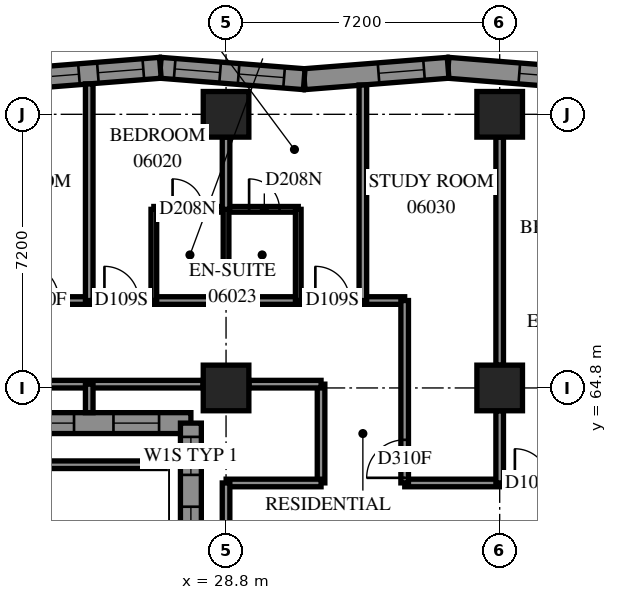
"""IFC4 building model, lengths in metres.
Left out: names, types, materials, properties, quantities, classifications, styles, units other than length and angle.
Written with IfcOpenShell. Run it as: python <this file> out.ifc"""

import sys

from ifc_helpers import new_model, si_unit, direction, frame, frame_2d, origin, origin_2d, place, context, subcontext, project, spatial, polyline, rectangle, outline, extrude, element, fill, save


model = new_model("IFC4")
c1 = context("Model", 3, precision=1e-05, world=origin(), true_north=direction((0.0, 1.0)))
c2 = subcontext(c1, "Body", "Model", "MODEL_VIEW")
j1 = project(units=[si_unit("LENGTHUNIT", "METRE"), si_unit("PLANEANGLEUNIT", "RADIAN")], contexts=[c1])
p1 = place(None, origin())
s1 = spatial("IfcSite", under=j1, at=p1, CompositionType="ELEMENT")
p2 = place(p1, origin())
s2 = spatial("IfcBuilding", under=s1, at=p2, CompositionType="ELEMENT")
p3 = place(p2, frame((0.0, 0.0, 27.0)))
s3 = spatial("IfcBuildingStorey", under=s2, at=p3, CompositionType="ELEMENT", Elevation=27.0)
for number, where, z_axis, x_axis in (
    (1, (28.8, 64.8, 0.0), (0.0, 0.0, 1.0), (1.0, 0.0, 0.0)),
    (2, (28.8, 72.0, 0.0), (0.0, 0.0, 1.0), (1.0, 0.0, 0.0)),
    (3, (36.0, 64.8, 0.0), (0.0, 0.0, 1.0), (1.0, 0.0, 0.0)),
    (4, (36.0, 72.0, 0.0), (0.0, 0.0, 1.0), (1.0, 0.0, 0.0)),
):
    element("IfcColumn", number, at=place(p3, frame(where, z_axis=z_axis, x_axis=x_axis)), inside=s3, PredefinedType="COLUMN", context=c2, shape_type="SweptSolid", body=[
        extrude(rectangle(XDim=1.2, YDim=1.2, at=origin_2d()), origin(), (0.0, 0.0, 1.0), 3.1),
    ])
p4 = place(p3, frame((38.428, 72.924, 0.0), z_axis=(0.0, 0.0, 1.0), x_axis=(-0.9968746163, 0.078999996, 0.0)))
e5 = element("IfcWall", 5, at=p4, inside=s3, PredefinedType="SOLIDWALL", context=c2, shape_type="SweptSolid", body=[
    extrude(outline(polyline([(0.022, -0.275), (3.819, -0.275), (3.776, 0.275), (-0.022, 0.275), (0.022, -0.275)])), origin(), (0.0, 0.0, 1.0), 3.1),
])
p5 = place(p4, frame((0.718, 0.0, 0.5)))
e6 = element("IfcOpeningElement", 6, at=p5, cuts=e5, PredefinedType="OPENING", context=c2, shape_type="SweptSolid", body=[
    extrude(rectangle(XDim=1.2, YDim=2.45, at=frame_2d((0.6, 1.225))), frame((0.0, 0.285, 0.0), z_axis=(0.0, -1.0, 0.0), x_axis=(1.0, 0.0, 0.0)), (0.0, 0.0, 1.0), 0.57),
])
p6 = place(p3, frame((34.642, 73.224, 0.0), z_axis=(0.0, 0.0, 1.0), x_axis=(-0.9968746163, -0.078999996, 0.0)))
e7 = element("IfcWall", 7, at=p6, inside=s3, PredefinedType="SOLIDWALL", context=c2, shape_type="SweptSolid", body=[
    extrude(outline(polyline([(-0.022, -0.275), (3.776, -0.275), (3.819, 0.275), (0.022, 0.275), (-0.022, -0.275)])), origin(), (0.0, 0.0, 1.0), 3.1),
])
p7 = place(p6, frame((0.636, 0.0, 0.5)))
e8 = element("IfcOpeningElement", 8, at=p7, cuts=e7, PredefinedType="OPENING", context=c2, shape_type="SweptSolid", body=[
    extrude(rectangle(XDim=1.2, YDim=2.45, at=frame_2d((0.6, 1.225))), frame((0.0, 0.285, 0.0), z_axis=(0.0, -1.0, 0.0), x_axis=(1.0, 0.0, 0.0)), (0.0, 0.0, 1.0), 0.57),
])
p8 = place(p3, frame((30.857, 72.924, 0.0), z_axis=(0.0, 0.0, 1.0), x_axis=(-0.9968747806, 0.0789979222, 0.0)))
e9 = element("IfcWall", 9, at=p8, inside=s3, PredefinedType="SOLIDWALL", context=c2, shape_type="SweptSolid", body=[
    extrude(outline(polyline([(0.022, -0.275), (3.819, -0.275), (3.776, 0.275), (-0.022, 0.275), (0.022, -0.275)])), origin(), (0.0, 0.0, 1.0), 3.1),
])
p9 = place(p8, frame((0.532, 0.0, 0.5)))
e10 = element("IfcOpeningElement", 10, at=p9, cuts=e9, PredefinedType="OPENING", context=c2, shape_type="SweptSolid", body=[
    extrude(rectangle(XDim=1.2, YDim=2.45, at=frame_2d((0.6, 1.225))), frame((0.0, 0.285, 0.0), z_axis=(0.0, -1.0, 0.0), x_axis=(1.0, 0.0, 0.0)), (0.0, 0.0, 1.0), 0.57),
])
p10 = place(p8, frame((2.22, 0.0, 0.5)))
e11 = element("IfcOpeningElement", 11, at=p10, cuts=e9, PredefinedType="OPENING", context=c2, shape_type="SweptSolid", body=[
    extrude(rectangle(XDim=1.2, YDim=2.45, at=frame_2d((0.6, 1.225))), frame((0.0, 0.285, 0.0), z_axis=(0.0, -1.0, 0.0), x_axis=(1.0, 0.0, 0.0)), (0.0, 0.0, 1.0), 0.57),
])
p11 = place(p3, frame((27.071, 73.224, 0.0), z_axis=(0.0, 0.0, 1.0), x_axis=(-0.9968745318, -0.0790010628, 0.0)))
e12 = element("IfcWall", 12, at=p11, inside=s3, PredefinedType="SOLIDWALL", context=c2, shape_type="SweptSolid", body=[
    extrude(outline(polyline([(-0.022, -0.275), (3.776, -0.275), (3.862, 0.275), (0.022, 0.275), (-0.022, -0.275)])), origin(), (0.0, 0.0, 1.0), 3.1),
])
p12 = place(p11, frame((0.449, 0.0, 0.5)))
e13 = element("IfcOpeningElement", 13, at=p12, cuts=e12, PredefinedType="OPENING", context=c2, shape_type="SweptSolid", body=[
    extrude(rectangle(XDim=1.2, YDim=2.45, at=frame_2d((0.6, 1.225))), frame((0.0, 0.285, 0.0), z_axis=(0.0, -1.0, 0.0), x_axis=(1.0, 0.0, 0.0)), (0.0, 0.0, 1.0), 0.57),
])
p13 = place(p11, frame((2.148, 0.0, 0.5)))
e14 = element("IfcOpeningElement", 14, at=p13, cuts=e12, PredefinedType="OPENING", context=c2, shape_type="SweptSolid", body=[
    extrude(rectangle(XDim=1.2, YDim=2.45, at=frame_2d((0.6, 1.225))), frame((0.0, 0.285, 0.0), z_axis=(0.0, -1.0, 0.0), x_axis=(1.0, 0.0, 0.0)), (0.0, 0.0, 1.0), 0.57),
])
p14 = place(p3, frame((19.775, 63.875, 0.0), z_axis=(0.0, 0.0, 1.0), x_axis=(1.0, 0.0, 0.0)))
e15 = element("IfcWall", 15, at=p14, inside=s3, PredefinedType="SOLIDWALL", context=c2, shape_type="SweptSolid", body=[
    extrude(outline(polyline([(-0.275, -0.275), (7.825, -0.275), (8.375, 0.275), (0.275, 0.275), (-0.275, -0.275)])), origin(), (0.0, 0.0, 1.0), 3.1),
])
p15 = place(p14, frame((2.225, 0.0, 0.5)))
e16 = element("IfcOpeningElement", 16, at=p15, cuts=e15, PredefinedType="OPENING", context=c2, shape_type="SweptSolid", body=[
    extrude(rectangle(XDim=2.8, YDim=2.45, at=frame_2d((1.4, 1.225))), frame((0.0, 0.285, 0.0), z_axis=(0.0, -1.0, 0.0), x_axis=(1.0, 0.0, 0.0)), (0.0, 0.0, 1.0), 0.57),
])
p16 = place(p14, frame((6.062, 0.0, 0.5)))
e17 = element("IfcOpeningElement", 17, at=p16, cuts=e15, PredefinedType="OPENING", context=c2, shape_type="SweptSolid", body=[
    extrude(rectangle(XDim=1.2, YDim=2.45, at=frame_2d((0.6, 1.225))), frame((0.0, 0.285, 0.0), z_axis=(0.0, -1.0, 0.0), x_axis=(1.0, 0.0, 0.0)), (0.0, 0.0, 1.0), 0.57),
])
p17 = place(p3, frame((27.875, 63.875, 0.0), z_axis=(0.0, 0.0, 1.0), x_axis=(0.0, -1.0, 0.0)))
e18 = element("IfcWall", 18, at=p17, inside=s3, PredefinedType="SOLIDWALL", context=c2, shape_type="SweptSolid", body=[
    extrude(outline(polyline([(0.275, -0.275), (7.475, -0.275), (6.925, 0.275), (-0.275, 0.275), (0.275, -0.275)])), origin(), (0.0, 0.0, 1.0), 3.1),
])
p18 = place(p17, frame((3.975, 0.0, 0.7)))
e19 = element("IfcOpeningElement", 19, at=p18, cuts=e18, PredefinedType="OPENING", context=c2, shape_type="SweptSolid", body=[
    extrude(rectangle(XDim=1.8, YDim=2.2, at=frame_2d((0.9, 1.1))), frame((0.0, 0.285, 0.0), z_axis=(0.0, -1.0, 0.0), x_axis=(1.0, 0.0, 0.0)), (0.0, 0.0, 1.0), 0.57),
])
p19 = place(p17, frame((0.362, 0.0, 0.45)))
e20 = element("IfcOpeningElement", 20, at=p19, cuts=e18, PredefinedType="OPENING", context=c2, shape_type="SweptSolid", body=[
    extrude(rectangle(XDim=1.0, YDim=2.5, at=frame_2d((0.5, 1.25))), frame((0.0, 0.285, 0.0), z_axis=(0.0, -1.0, 0.0), x_axis=(1.0, 0.0, 0.0)), (0.0, 0.0, 1.0), 0.57),
])
p20 = place(p17, frame((2.2, 0.0, 0.5)))
e21 = element("IfcOpeningElement", 21, at=p20, cuts=e18, PredefinedType="OPENING", context=c2, shape_type="SweptSolid", body=[
    extrude(rectangle(XDim=1.2, YDim=2.45, at=frame_2d((0.6, 1.225))), frame((0.0, 0.285, 0.0), z_axis=(0.0, -1.0, 0.0), x_axis=(1.0, 0.0, 0.0)), (0.0, 0.0, 1.0), 0.57),
])
p21 = place(p3, frame((33.502, 62.3, 0.0), z_axis=(0.0, 0.0, 1.0), x_axis=(1.0, 0.0, 0.0)))
e22 = element("IfcWall", 22, at=p21, inside=s3, PredefinedType="PARTITIONING", context=c2, shape_type="SweptSolid", body=[
    extrude(rectangle(XDim=20.998, YDim=0.2, at=frame_2d((10.499, 0.0))), origin(), (0.0, 0.0, 1.0), 3.1),
])
p22 = place(p21, frame((2.898, 0.0, 0.0)))
e23 = element("IfcOpeningElement", 23, at=p22, cuts=e22, PredefinedType="OPENING", context=c2, shape_type="SweptSolid", body=[
    extrude(rectangle(XDim=0.9, YDim=2.1, at=frame_2d((0.45, 1.05))), frame((0.0, 0.11, 0.0), z_axis=(0.0, -1.0, 0.0), x_axis=(1.0, 0.0, 0.0)), (0.0, 0.0, 1.0), 0.22),
])
p23 = place(p21, frame((8.448, 0.0, 0.0)))
e24 = element("IfcOpeningElement", 24, at=p23, cuts=e22, PredefinedType="OPENING", context=c2, shape_type="SweptSolid", body=[
    extrude(rectangle(XDim=0.9, YDim=2.1, at=frame_2d((0.45, 1.05))), frame((0.0, 0.11, 0.0), z_axis=(0.0, -1.0, 0.0), x_axis=(1.0, 0.0, 0.0)), (0.0, 0.0, 1.0), 0.22),
])
p24 = place(p21, frame((10.098, 0.0, 0.0)))
e25 = element("IfcOpeningElement", 25, at=p24, cuts=e22, PredefinedType="OPENING", context=c2, shape_type="SweptSolid", body=[
    extrude(rectangle(XDim=0.9, YDim=2.1, at=frame_2d((0.45, 1.05))), frame((0.0, 0.11, 0.0), z_axis=(0.0, -1.0, 0.0), x_axis=(1.0, 0.0, 0.0)), (0.0, 0.0, 1.0), 0.22),
])
p25 = place(p21, frame((15.648, 0.0, 0.0)))
e26 = element("IfcOpeningElement", 26, at=p25, cuts=e22, PredefinedType="OPENING", context=c2, shape_type="SweptSolid", body=[
    extrude(rectangle(XDim=0.9, YDim=2.1, at=frame_2d((0.45, 1.05))), frame((0.0, 0.11, 0.0), z_axis=(0.0, -1.0, 0.0), x_axis=(1.0, 0.0, 0.0)), (0.0, 0.0, 1.0), 0.22),
])
p26 = place(p21, frame((17.298, 0.0, 0.0)))
e27 = element("IfcOpeningElement", 27, at=p26, cuts=e22, PredefinedType="OPENING", context=c2, shape_type="SweptSolid", body=[
    extrude(rectangle(XDim=0.9, YDim=2.1, at=frame_2d((0.45, 1.05))), frame((0.0, 0.11, 0.0), z_axis=(0.0, -1.0, 0.0), x_axis=(1.0, 0.0, 0.0)), (0.0, 0.0, 1.0), 0.22),
])
p27 = place(p3, frame((21.602, 67.1, 0.0), z_axis=(0.0, 0.0, 1.0), x_axis=(1.0, 0.0, 0.0)))
e28 = element("IfcWall", 28, at=p27, inside=s3, PredefinedType="PARTITIONING", context=c2, shape_type="SweptSolid", body=[
    extrude(rectangle(XDim=11.898, YDim=0.2, at=frame_2d((5.949, 0.0))), origin(), (0.0, 0.0, 1.0), 3.1),
])
p28 = place(p27, frame((1.798, 0.0, 0.0)))
e29 = element("IfcOpeningElement", 29, at=p28, cuts=e28, PredefinedType="OPENING", context=c2, shape_type="SweptSolid", body=[
    extrude(rectangle(XDim=1.0, YDim=2.1, at=frame_2d((0.5, 1.05))), frame((0.0, 0.11, 0.0), z_axis=(0.0, -1.0, 0.0), x_axis=(1.0, 0.0, 0.0)), (0.0, 0.0, 1.0), 0.22),
])
p29 = place(p27, frame((3.998, 0.0, 0.0)))
e30 = element("IfcOpeningElement", 30, at=p29, cuts=e28, PredefinedType="OPENING", context=c2, shape_type="SweptSolid", body=[
    extrude(rectangle(XDim=0.9, YDim=2.1, at=frame_2d((0.45, 1.05))), frame((0.0, 0.11, 0.0), z_axis=(0.0, -1.0, 0.0), x_axis=(1.0, 0.0, 0.0)), (0.0, 0.0, 1.0), 0.22),
])
p30 = place(p27, frame((9.548, 0.0, 0.0)))
e31 = element("IfcOpeningElement", 31, at=p30, cuts=e28, PredefinedType="OPENING", context=c2, shape_type="SweptSolid", body=[
    extrude(rectangle(XDim=0.9, YDim=2.1, at=frame_2d((0.45, 1.05))), frame((0.0, 0.11, 0.0), z_axis=(0.0, -1.0, 0.0), x_axis=(1.0, 0.0, 0.0)), (0.0, 0.0, 1.0), 0.22),
])
p31 = place(p3, frame((22.2, 64.9, 0.0), z_axis=(0.0, 0.0, 1.0), x_axis=(1.0, 0.0, 0.0)))
e32 = element("IfcWall", 32, at=p31, inside=s3, PredefinedType="PARTITIONING", context=c2, shape_type="SweptSolid", body=[
    extrude(rectangle(XDim=6.0, YDim=0.2, at=frame_2d((3.0, 0.0))), origin(), (0.0, 0.0, 1.0), 2.6),
])
p32 = place(p3, frame((36.0, 65.4, 0.0), z_axis=(0.0, 0.0, 1.0), x_axis=(0.0, 1.0, 0.0)))
e33 = element("IfcWall", 33, at=p32, inside=s3, PredefinedType="PARTITIONING", context=c2, shape_type="SweptSolid", body=[
    extrude(rectangle(XDim=6.0, YDim=0.2, at=frame_2d((3.0, 0.0))), origin(), (0.0, 0.0, 1.0), 3.1),
])
p33 = place(p3, frame((25.2, 67.1, 0.0), z_axis=(0.0, 0.0, 1.0), x_axis=(0.0, 1.0, 0.0)))
e34 = element("IfcWall", 34, at=p33, inside=s3, PredefinedType="PARTITIONING", context=c2, shape_type="SweptSolid", body=[
    extrude(rectangle(XDim=5.7, YDim=0.2, at=frame_2d((2.85, 0.0))), origin(), (0.0, 0.0, 1.0), 3.1),
])
p34 = place(p3, frame((32.4, 67.1, 0.0), z_axis=(0.0, 0.0, 1.0), x_axis=(0.0, 1.0, 0.0)))
e35 = element("IfcWall", 35, at=p34, inside=s3, PredefinedType="PARTITIONING", context=c2, shape_type="SweptSolid", body=[
    extrude(rectangle(XDim=5.671, YDim=0.2, at=frame_2d((2.835, 0.0))), origin(), (0.0, 0.0, 1.0), 3.1),
])
p35 = place(p3, frame((33.5, 62.302, 0.0), z_axis=(0.0, 0.0, 1.0), x_axis=(0.0, 1.0, 0.0)))
e36 = element("IfcWall", 36, at=p35, inside=s3, PredefinedType="PARTITIONING", context=c2, shape_type="SweptSolid", body=[
    extrude(rectangle(XDim=4.798, YDim=0.2, at=frame_2d((2.399, 0.0))), origin(), (0.0, 0.0, 1.0), 3.1),
])
p36 = place(p35, frame((0.133, 0.0, 0.0)))
e37 = element("IfcOpeningElement", 37, at=p36, cuts=e36, PredefinedType="OPENING", context=c2, shape_type="SweptSolid", body=[
    extrude(rectangle(XDim=1.0, YDim=2.1, at=frame_2d((0.5, 1.05))), frame((0.0, 0.11, 0.0), z_axis=(0.0, -1.0, 0.0), x_axis=(1.0, 0.0, 0.0)), (0.0, 0.0, 1.0), 0.22),
])
p37 = place(p3, frame((26.9, 69.5, 0.0), z_axis=(0.0, 0.0, 1.0), x_axis=(1.0, 0.0, 0.0)))
e38 = element("IfcWall", 38, at=p37, inside=s3, PredefinedType="PARTITIONING", context=c2, shape_type="SweptSolid", body=[
    extrude(rectangle(XDim=3.8, YDim=0.15, at=frame_2d((1.9, 0.0))), origin(), (0.0, 0.0, 1.0), 3.1),
])
p38 = place(p37, frame((0.493, 0.0, 0.0)))
e39 = element("IfcOpeningElement", 39, at=p38, cuts=e38, PredefinedType="OPENING", context=c2, shape_type="SweptSolid", body=[
    extrude(rectangle(XDim=0.8, YDim=2.1, at=frame_2d((0.4, 1.05))), frame((0.0, 0.085, 0.0), z_axis=(0.0, -1.0, 0.0), x_axis=(1.0, 0.0, 0.0)), (0.0, 0.0, 1.0), 0.17),
])
p39 = place(p37, frame((2.507, 0.0, 0.0)))
e40 = element("IfcOpeningElement", 40, at=p39, cuts=e38, PredefinedType="OPENING", context=c2, shape_type="SweptSolid", body=[
    extrude(rectangle(XDim=0.8, YDim=2.1, at=frame_2d((0.4, 1.05))), frame((0.0, 0.085, 0.0), z_axis=(0.0, -1.0, 0.0), x_axis=(1.0, 0.0, 0.0)), (0.0, 0.0, 1.0), 0.17),
])
p40 = place(p3, frame((31.3, 62.302, 0.0), z_axis=(0.0, 0.0, 1.0), x_axis=(0.0, 1.0, 0.0)))
e41 = element("IfcWall", 41, at=p40, inside=s3, PredefinedType="PARTITIONING", context=c2, shape_type="SweptSolid", body=[
    extrude(rectangle(XDim=2.598, YDim=0.2, at=frame_2d((1.299, 0.0))), origin(), (0.0, 0.0, 1.0), 3.1),
])
p41 = place(p3, frame((28.802, 62.3, 0.0), z_axis=(0.0, 0.0, 1.0), x_axis=(1.0, 0.0, 0.0)))
e42 = element("IfcWall", 42, at=p41, inside=s3, PredefinedType="PARTITIONING", context=c2, shape_type="SweptSolid", body=[
    extrude(rectangle(XDim=2.498, YDim=0.2, at=frame_2d((1.249, 0.0))), origin(), (0.0, 0.0, 1.0), 3.1),
])
for number, where, z_axis, x_axis in (
    (43, (26.9, 67.1, 0.0), (0.0, 0.0, 1.0), (0.0, 1.0, 0.0)),
    (44, (28.8, 67.1, 0.0), (0.0, 0.0, 1.0), (0.0, 1.0, 0.0)),
    (45, (30.7, 67.1, 0.0), (0.0, 0.0, 1.0), (0.0, 1.0, 0.0)),
):
    element("IfcWall", number, at=place(p3, frame(where, z_axis=z_axis, x_axis=x_axis)), inside=s3, PredefinedType="PARTITIONING", context=c2, shape_type="SweptSolid", body=[
        extrude(rectangle(XDim=2.4, YDim=0.15, at=frame_2d((1.2, 0.0))), origin(), (0.0, 0.0, 1.0), 3.1),
    ])
p42 = place(p3, frame((28.8, 60.1, 0.0), z_axis=(0.0, 0.0, 1.0), x_axis=(0.0, 1.0, 0.0)))
e46 = element("IfcWall", 46, at=p42, inside=s3, PredefinedType="PARTITIONING", context=c2, shape_type="SweptSolid", body=[
    extrude(rectangle(XDim=2.2, YDim=0.2, at=frame_2d((1.1, 0.0))), origin(), (0.0, 0.0, 1.0), 2.6),
])
for number, where, z_axis, x_axis in (
    (47, (28.8, 69.5, 0.0), (0.0, 0.0, 1.0), (0.0, 1.0, 0.0)),
    (48, (36.0, 62.3, 0.0), (0.0, 0.0, 1.0), (0.0, 1.0, 0.0)),
    (49, (29.4, 64.9, 0.0), (0.0, 0.0, 1.0), (1.0, 0.0, 0.0)),
):
    element("IfcWall", number, at=place(p3, frame(where, z_axis=z_axis, x_axis=x_axis)), inside=s3, PredefinedType="PARTITIONING", context=c2, shape_type="SweptSolid", body=[
        extrude(rectangle(XDim=1.9, YDim=0.2, at=frame_2d((0.95, 0.0))), origin(), (0.0, 0.0, 1.0), 3.1),
    ])
p43 = place(p3, frame((25.2, 64.15, 0.0), z_axis=(0.0, 0.0, 1.0), x_axis=(0.0, 1.0, 0.0)))
e50 = element("IfcWall", 50, at=p43, inside=s3, PredefinedType="PARTITIONING", context=c2, shape_type="SweptSolid", body=[
    extrude(rectangle(XDim=0.75, YDim=0.2, at=frame_2d((0.375, 0.0))), origin(), (0.0, 0.0, 1.0), 3.1),
])
p44 = place(p3, frame((28.2, 64.9, 0.0), z_axis=(0.0, 0.0, 1.0), x_axis=(1.0, 0.0, 0.0)))
e51 = element("IfcWall", 51, at=p44, inside=s3, PredefinedType="PARTITIONING", context=c2, shape_type="SweptSolid", body=[
    extrude(rectangle(XDim=1.2, YDim=0.2, at=frame_2d((0.6, 0.0))), origin(), (0.0, 0.0, 1.0), 3.1),
])
p45 = place(p3, frame((18.68, 62.78, 0.0), z_axis=(0.0, 0.0, 1.0), x_axis=(1.0, 0.0, 0.0)))
e52 = element("IfcWall", 52, at=p45, inside=s3, PredefinedType="PARAPET", context=c2, shape_type="SweptSolid", body=[
    extrude(rectangle(XDim=8.52, YDim=0.2, at=frame_2d((4.26, 0.0))), origin(), (0.0, 0.0, 1.0), 0.9),
])
p46 = place(p5, origin())
e53 = element("IfcWindow", 53, at=p46, inside=s3, PartitioningType="SINGLE_PANEL", PredefinedType="WINDOW", context=c2, shape_type="SweptSolid", body=[
    extrude(rectangle(XDim=1.2, YDim=2.45, at=frame_2d((0.6, 1.225))), frame((0.0, 0.155, 0.0), z_axis=(0.0, -1.0, 0.0), x_axis=(1.0, 0.0, 0.0)), (0.0, 0.0, 1.0), 0.06),
])
fill(e6, e53)
p47 = place(p7, origin())
e54 = element("IfcWindow", 54, at=p47, inside=s3, PartitioningType="SINGLE_PANEL", PredefinedType="WINDOW", context=c2, shape_type="SweptSolid", body=[
    extrude(rectangle(XDim=1.2, YDim=2.45, at=frame_2d((0.6, 1.225))), frame((0.0, 0.155, 0.0), z_axis=(0.0, -1.0, 0.0), x_axis=(1.0, 0.0, 0.0)), (0.0, 0.0, 1.0), 0.06),
])
fill(e8, e54)
p48 = place(p9, origin())
e55 = element("IfcWindow", 55, at=p48, inside=s3, PartitioningType="SINGLE_PANEL", PredefinedType="WINDOW", context=c2, shape_type="SweptSolid", body=[
    extrude(rectangle(XDim=1.2, YDim=2.45, at=frame_2d((0.6, 1.225))), frame((0.0, 0.155, 0.0), z_axis=(0.0, -1.0, 0.0), x_axis=(1.0, 0.0, 0.0)), (0.0, 0.0, 1.0), 0.06),
])
fill(e10, e55)
p49 = place(p10, origin())
e56 = element("IfcWindow", 56, at=p49, inside=s3, PartitioningType="SINGLE_PANEL", PredefinedType="WINDOW", context=c2, shape_type="SweptSolid", body=[
    extrude(rectangle(XDim=1.2, YDim=2.45, at=frame_2d((0.6, 1.225))), frame((0.0, 0.155, 0.0), z_axis=(0.0, -1.0, 0.0), x_axis=(1.0, 0.0, 0.0)), (0.0, 0.0, 1.0), 0.06),
])
fill(e11, e56)
p50 = place(p12, origin())
e57 = element("IfcWindow", 57, at=p50, inside=s3, PartitioningType="SINGLE_PANEL", PredefinedType="WINDOW", context=c2, shape_type="SweptSolid", body=[
    extrude(rectangle(XDim=1.2, YDim=2.45, at=frame_2d((0.6, 1.225))), frame((0.0, 0.155, 0.0), z_axis=(0.0, -1.0, 0.0), x_axis=(1.0, 0.0, 0.0)), (0.0, 0.0, 1.0), 0.06),
])
fill(e13, e57)
p51 = place(p13, origin())
e58 = element("IfcWindow", 58, at=p51, inside=s3, PartitioningType="SINGLE_PANEL", PredefinedType="WINDOW", context=c2, shape_type="SweptSolid", body=[
    extrude(rectangle(XDim=1.2, YDim=2.45, at=frame_2d((0.6, 1.225))), frame((0.0, 0.155, 0.0), z_axis=(0.0, -1.0, 0.0), x_axis=(1.0, 0.0, 0.0)), (0.0, 0.0, 1.0), 0.06),
])
fill(e14, e58)
p52 = place(p15, origin())
e59 = element("IfcWindow", 59, at=p52, inside=s3, PartitioningType="SINGLE_PANEL", PredefinedType="WINDOW", context=c2, shape_type="SweptSolid", body=[
    extrude(rectangle(XDim=2.8, YDim=2.45, at=frame_2d((1.4, 1.225))), frame((0.0, 0.155, 0.0), z_axis=(0.0, -1.0, 0.0), x_axis=(1.0, 0.0, 0.0)), (0.0, 0.0, 1.0), 0.06),
])
fill(e16, e59)
p53 = place(p16, origin())
e60 = element("IfcWindow", 60, at=p53, inside=s3, PartitioningType="SINGLE_PANEL", PredefinedType="WINDOW", context=c2, shape_type="SweptSolid", body=[
    extrude(rectangle(XDim=1.2, YDim=2.45, at=frame_2d((0.6, 1.225))), frame((0.0, 0.155, 0.0), z_axis=(0.0, -1.0, 0.0), x_axis=(1.0, 0.0, 0.0)), (0.0, 0.0, 1.0), 0.06),
])
fill(e17, e60)
p54 = place(p28, origin())
e61 = element("IfcDoor", 61, at=p54, inside=s3, OperationType="SINGLE_SWING_RIGHT", PredefinedType="DOOR", context=c2, shape_type="SweptSolid", body=[
    extrude(rectangle(XDim=1.0, YDim=2.1, at=frame_2d((0.5, 1.05))), frame((0.0, 0.025, 0.0), z_axis=(0.0, -1.0, 0.0), x_axis=(1.0, 0.0, 0.0)), (0.0, 0.0, 1.0), 0.05),
])
fill(e29, e61)
p55 = place(p29, origin())
e62 = element("IfcDoor", 62, at=p55, inside=s3, OperationType="SINGLE_SWING_LEFT", PredefinedType="DOOR", context=c2, shape_type="SweptSolid", body=[
    extrude(rectangle(XDim=0.9, YDim=2.1, at=frame_2d((0.45, 1.05))), frame((0.0, 0.025, 0.0), z_axis=(0.0, -1.0, 0.0), x_axis=(1.0, 0.0, 0.0)), (0.0, 0.0, 1.0), 0.05),
])
fill(e30, e62)
p56 = place(p38, origin())
e63 = element("IfcDoor", 63, at=p56, inside=s3, OperationType="SINGLE_SWING_RIGHT", PredefinedType="DOOR", context=c2, shape_type="SweptSolid", body=[
    extrude(rectangle(XDim=0.8, YDim=2.1, at=frame_2d((0.4, 1.05))), frame((0.0, 0.025, 0.0), z_axis=(0.0, -1.0, 0.0), x_axis=(1.0, 0.0, 0.0)), (0.0, 0.0, 1.0), 0.05),
])
fill(e39, e63)
p57 = place(p30, origin())
e64 = element("IfcDoor", 64, at=p57, inside=s3, OperationType="SINGLE_SWING_RIGHT", PredefinedType="DOOR", context=c2, shape_type="SweptSolid", body=[
    extrude(rectangle(XDim=0.9, YDim=2.1, at=frame_2d((0.45, 1.05))), frame((0.0, 0.025, 0.0), z_axis=(0.0, -1.0, 0.0), x_axis=(1.0, 0.0, 0.0)), (0.0, 0.0, 1.0), 0.05),
])
fill(e31, e64)
p58 = place(p39, origin())
e65 = element("IfcDoor", 65, at=p58, inside=s3, OperationType="SINGLE_SWING_RIGHT", PredefinedType="DOOR", context=c2, shape_type="SweptSolid", body=[
    extrude(rectangle(XDim=0.8, YDim=2.1, at=frame_2d((0.4, 1.05))), frame((0.0, 0.025, 0.0), z_axis=(0.0, -1.0, 0.0), x_axis=(1.0, 0.0, 0.0)), (0.0, 0.0, 1.0), 0.05),
])
fill(e40, e65)
p59 = place(p36, origin())
e66 = element("IfcDoor", 66, at=p59, inside=s3, OperationType="SINGLE_SWING_LEFT", PredefinedType="DOOR", context=c2, shape_type="SweptSolid", body=[
    extrude(rectangle(XDim=1.0, YDim=2.1, at=frame_2d((0.5, 1.05))), frame((0.0, 0.025, 0.0), z_axis=(0.0, -1.0, 0.0), x_axis=(1.0, 0.0, 0.0)), (0.0, 0.0, 1.0), 0.05),
])
fill(e37, e66)
p60 = place(p22, origin())
e67 = element("IfcDoor", 67, at=p60, inside=s3, OperationType="SINGLE_SWING_RIGHT", PredefinedType="DOOR", context=c2, shape_type="SweptSolid", body=[
    extrude(rectangle(XDim=0.9, YDim=2.1, at=frame_2d((0.45, 1.05))), frame((0.0, 0.025, 0.0), z_axis=(0.0, -1.0, 0.0), x_axis=(1.0, 0.0, 0.0)), (0.0, 0.0, 1.0), 0.05),
])
fill(e23, e67)
p61 = place(p19, origin())
e68 = element("IfcWindow", 68, at=p61, inside=s3, PartitioningType="SINGLE_PANEL", PredefinedType="WINDOW", context=c2, shape_type="SweptSolid", body=[
    extrude(rectangle(XDim=1.0, YDim=2.5, at=frame_2d((0.5, 1.25))), frame((0.0, 0.155, 0.0), z_axis=(0.0, -1.0, 0.0), x_axis=(1.0, 0.0, 0.0)), (0.0, 0.0, 1.0), 0.06),
])
fill(e20, e68)
p62 = place(p20, origin())
e69 = element("IfcWindow", 69, at=p62, inside=s3, PartitioningType="SINGLE_PANEL", PredefinedType="WINDOW", context=c2, shape_type="SweptSolid", body=[
    extrude(rectangle(XDim=1.2, YDim=2.45, at=frame_2d((0.6, 1.225))), frame((0.0, 0.155, 0.0), z_axis=(0.0, -1.0, 0.0), x_axis=(1.0, 0.0, 0.0)), (0.0, 0.0, 1.0), 0.06),
])
fill(e21, e69)
save(model, sys.argv[1])
